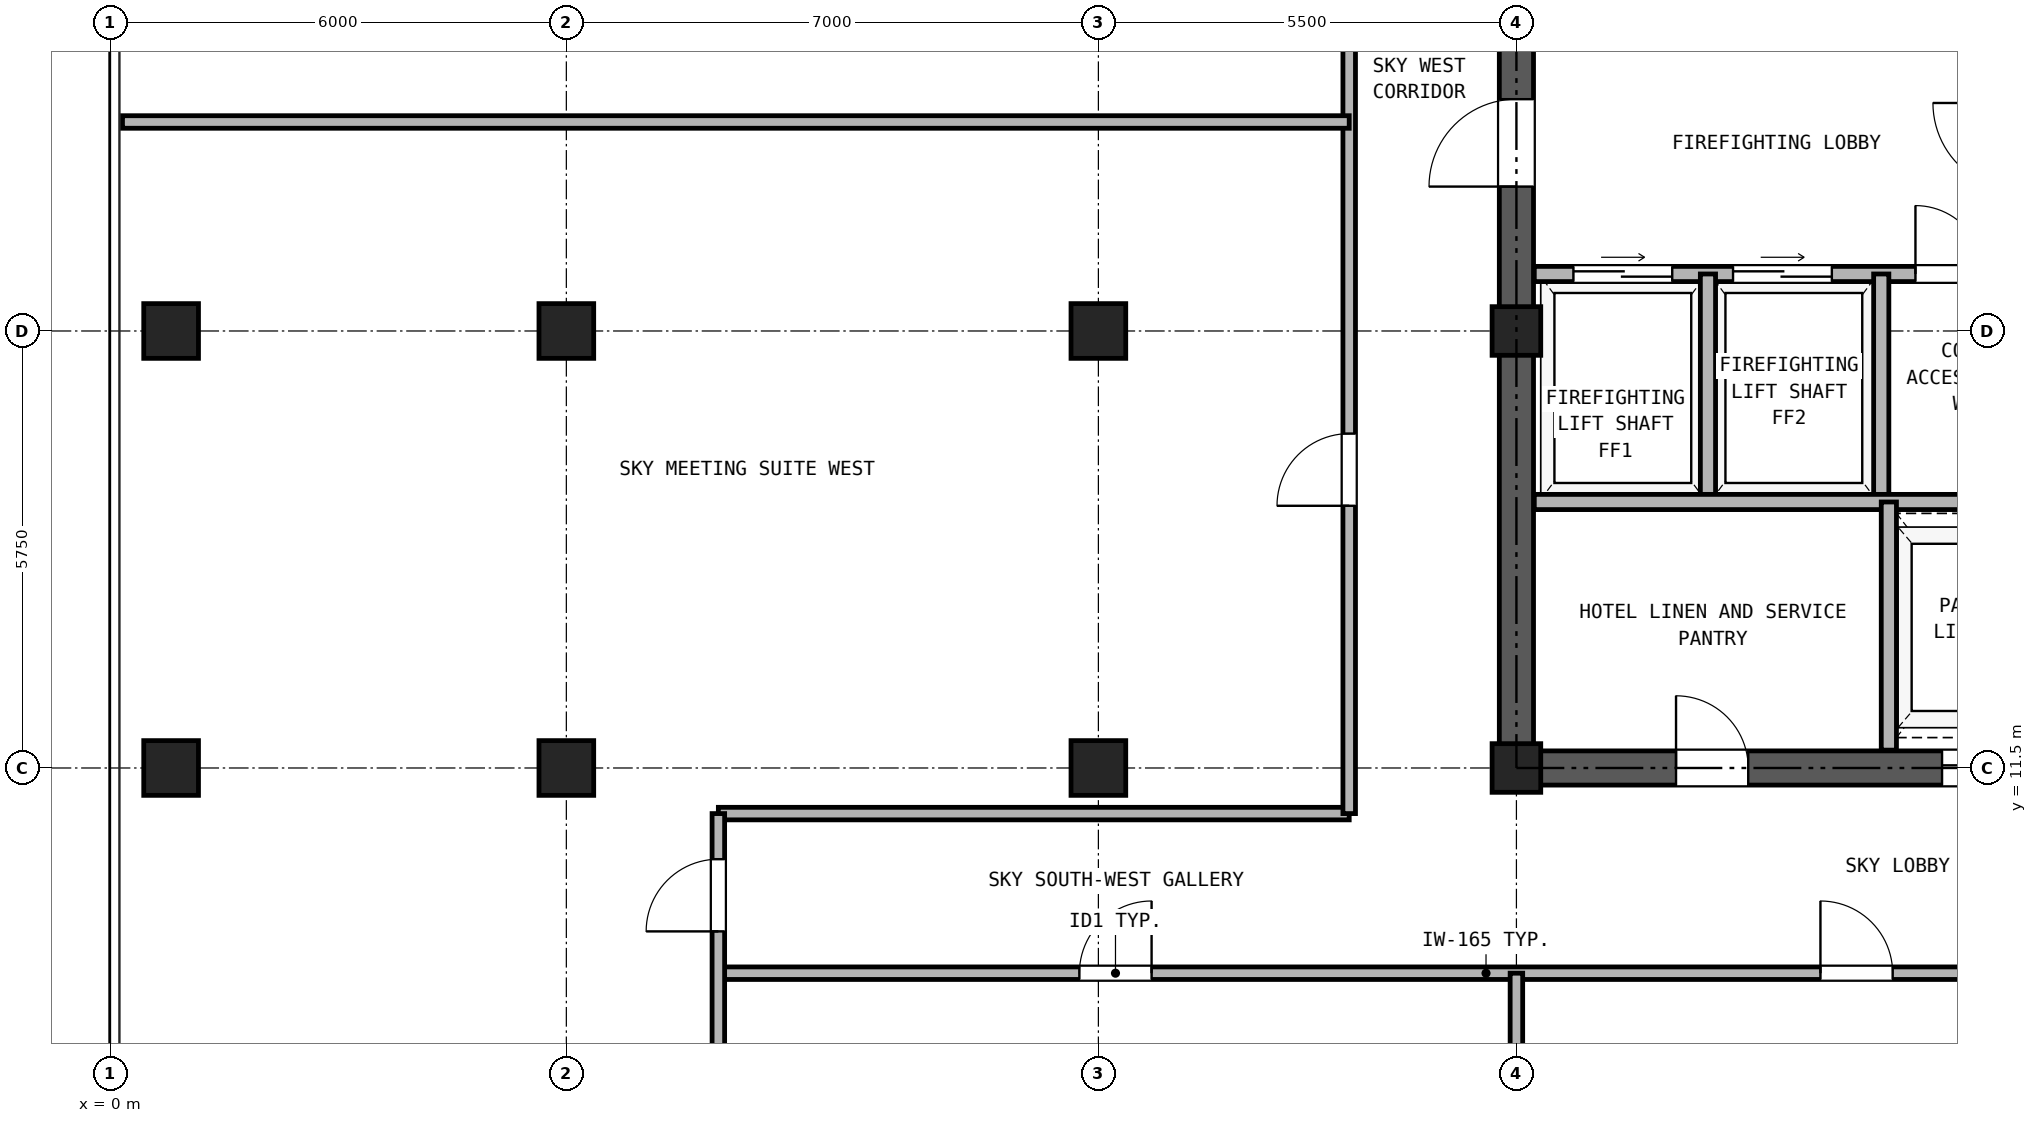
"""IFC4 building model, lengths in metres.
Left out: names, types, materials, properties, quantities, classifications, styles, units other than length and angle.
Written with IfcOpenShell. Run it as: python <this file> out.ifc"""

import sys

from ifc_helpers import new_model, si_unit, direction, frame, frame_2d, origin, origin_2d, place, context, subcontext, project, spatial, rectangle, hollow_rectangle, extrude, source, transform, mapped, element, fill, save


model = new_model("IFC4")
c1 = context("Model", 3, precision=1e-05, world=origin(), true_north=direction((0.0, 1.0)))
c2 = subcontext(c1, "Body", "Model", "MODEL_VIEW")
j1 = project(units=[si_unit("LENGTHUNIT", "METRE"), si_unit("PLANEANGLEUNIT", "RADIAN")], contexts=[c1])
p1 = place(None, origin())
s1 = spatial("IfcSite", under=j1, at=p1, CompositionType="ELEMENT")
p2 = place(p1, origin())
s2 = spatial("IfcBuilding", under=s1, at=p2, CompositionType="ELEMENT")
p3 = place(p2, frame((0.0, 0.0, 151.6)))
s3 = spatial("IfcBuildingStorey", under=s2, at=p3, CompositionType="ELEMENT", Elevation=151.6)
m1 = source(origin(), c2, "Body", "SweptSolid", [
    extrude(hollow_rectangle(XDim=0.72, YDim=0.72, WallThickness=0.04, at=origin_2d()), origin(), (0.0, 0.0, 1.0), 4.25),
])
for number, where, z_axis, x_axis in (
    (1, (0.8, 11.5, 0.0), (0.0, 0.0, 1.0), (1.0, 0.0, 0.0)),
    (2, (0.8, 17.25, 0.0), (0.0, 0.0, 1.0), (1.0, 0.0, 0.0)),
    (3, (6.0, 11.5, 0.0), (0.0, 0.0, 1.0), (1.0, 0.0, 0.0)),
    (4, (6.0, 17.25, 0.0), (0.0, 0.0, 1.0), (1.0, 0.0, 0.0)),
    (5, (13.0, 11.5, 0.0), (0.0, 0.0, 1.0), (1.0, 0.0, 0.0)),
    (6, (13.0, 17.25, 0.0), (0.0, 0.0, 1.0), (1.0, 0.0, 0.0)),
):
    element("IfcColumn", number, at=place(p3, frame(where, z_axis=z_axis, x_axis=x_axis)), inside=s3, PredefinedType="COLUMN", context=c2, shape_type="MappedRepresentation", body=[
        mapped(m1, transform((0.0, 0.0, 0.0), x_axis=(1.0, 0.0, 0.0), y_axis=(0.0, 1.0, 0.0), z_axis=(0.0, 0.0, 1.0), scale=1.0)),
    ])
m2 = source(origin(), c2, "Body", "SweptSolid", [
    extrude(hollow_rectangle(XDim=0.64, YDim=0.64, WallThickness=0.035, at=origin_2d()), origin(), (0.0, 0.0, 1.0), 4.25),
])
for number, where, z_axis, x_axis in (
    (7, (18.5, 11.5, 0.0), (0.0, 0.0, 1.0), (1.0, 0.0, 0.0)),
    (8, (18.5, 17.25, 0.0), (0.0, 0.0, 1.0), (1.0, 0.0, 0.0)),
):
    element("IfcColumn", number, at=place(p3, frame(where, z_axis=z_axis, x_axis=x_axis)), inside=s3, PredefinedType="COLUMN", context=c2, shape_type="MappedRepresentation", body=[
        mapped(m2, transform((0.0, 0.0, 0.0), x_axis=(1.0, 0.0, 0.0), y_axis=(0.0, 1.0, 0.0), z_axis=(0.0, 0.0, 1.0), scale=1.0)),
    ])
p4 = place(p3, frame((18.275, 11.5, 0.0), z_axis=(0.0, 0.0, 1.0), x_axis=(1.0, 0.0, 0.0)))
e9 = element("IfcWall", 9, at=p4, inside=s3, PredefinedType="SHEAR", context=c2, shape_type="SweptSolid", body=[
    extrude(rectangle(XDim=10.45, YDim=0.45, at=frame_2d((5.225, 0.0))), origin(), (0.0, 0.0, 1.0), 4.25),
])
p5 = place(p4, frame((2.325, 0.0, 0.0)))
e10 = element("IfcOpeningElement", 10, at=p5, cuts=e9, PredefinedType="OPENING", context=c2, shape_type="SweptSolid", body=[
    extrude(rectangle(XDim=0.95, YDim=2.15, at=frame_2d((0.475, 1.075))), frame((0.0, 0.235, 0.0), z_axis=(0.0, -1.0, 0.0), x_axis=(1.0, 0.0, 0.0)), (0.0, 0.0, 1.0), 0.47),
])
p6 = place(p4, frame((5.825, 0.0, 0.0)))
e11 = element("IfcOpeningElement", 11, at=p6, cuts=e9, PredefinedType="OPENING", context=c2, shape_type="SweptSolid", body=[
    extrude(rectangle(XDim=1.1, YDim=2.25, at=frame_2d((0.55, 1.125))), frame((0.0, 0.235, 0.0), z_axis=(0.0, -1.0, 0.0), x_axis=(1.0, 0.0, 0.0)), (0.0, 0.0, 1.0), 0.47),
])
p7 = place(p4, frame((8.225, 0.0, 0.0)))
e12 = element("IfcOpeningElement", 12, at=p7, cuts=e9, PredefinedType="OPENING", context=c2, shape_type="SweptSolid", body=[
    extrude(rectangle(XDim=1.1, YDim=2.25, at=frame_2d((0.55, 1.125))), frame((0.0, 0.235, 0.0), z_axis=(0.0, -1.0, 0.0), x_axis=(1.0, 0.0, 0.0)), (0.0, 0.0, 1.0), 0.47),
])
p8 = place(p3, frame((18.5, 11.725, 0.0), z_axis=(0.0, 0.0, 1.0), x_axis=(0.0, 1.0, 0.0)))
e13 = element("IfcWall", 13, at=p8, inside=s3, PredefinedType="SHEAR", context=c2, shape_type="SweptSolid", body=[
    extrude(rectangle(XDim=16.8, YDim=0.45, at=frame_2d((8.4, 0.0))), origin(), (0.0, 0.0, 1.0), 4.25),
])
p9 = place(p8, frame((7.425, 0.0, 0.0)))
e14 = element("IfcOpeningElement", 14, at=p9, cuts=e13, PredefinedType="OPENING", context=c2, shape_type="SweptSolid", body=[
    extrude(rectangle(XDim=1.15, YDim=2.2, at=frame_2d((0.575, 1.1))), frame((0.0, 0.235, 0.0), z_axis=(0.0, -1.0, 0.0), x_axis=(1.0, 0.0, 0.0)), (0.0, 0.0, 1.0), 0.47),
])
p10 = place(p3, frame((18.735, 18.0, 0.0), z_axis=(0.0, 0.0, 1.0), x_axis=(1.0, 0.0, 0.0)))
e15 = element("IfcWall", 15, at=p10, inside=s3, PredefinedType="PARTITIONING", context=c2, shape_type="SweptSolid", body=[
    extrude(rectangle(XDim=9.53, YDim=0.2, at=frame_2d((4.765, 0.0))), origin(), (0.0, 0.0, 1.0), 4.25),
])
p11 = place(p10, frame((0.515, 0.0, 0.0)))
e16 = element("IfcOpeningElement", 16, at=p11, cuts=e15, PredefinedType="OPENING", context=c2, shape_type="SweptSolid", body=[
    extrude(rectangle(XDim=1.3, YDim=2.3, at=frame_2d((0.65, 1.15))), frame((0.0, 0.11, 0.0), z_axis=(0.0, -1.0, 0.0), x_axis=(1.0, 0.0, 0.0)), (0.0, 0.0, 1.0), 0.22),
])
p12 = place(p10, frame((2.615, 0.0, 0.0)))
e17 = element("IfcOpeningElement", 17, at=p12, cuts=e15, PredefinedType="OPENING", context=c2, shape_type="SweptSolid", body=[
    extrude(rectangle(XDim=1.3, YDim=2.3, at=frame_2d((0.65, 1.15))), frame((0.0, 0.11, 0.0), z_axis=(0.0, -1.0, 0.0), x_axis=(1.0, 0.0, 0.0)), (0.0, 0.0, 1.0), 0.22),
])
p13 = place(p10, frame((5.015, 0.0, 0.0)))
e18 = element("IfcOpeningElement", 18, at=p13, cuts=e15, PredefinedType="OPENING", context=c2, shape_type="SweptSolid", body=[
    extrude(rectangle(XDim=0.9, YDim=2.05, at=frame_2d((0.45, 1.025))), frame((0.0, 0.11, 0.0), z_axis=(0.0, -1.0, 0.0), x_axis=(1.0, 0.0, 0.0)), (0.0, 0.0, 1.0), 0.22),
])
p14 = place(p10, frame((7.715, 0.0, 0.0)))
e19 = element("IfcOpeningElement", 19, at=p14, cuts=e15, PredefinedType="OPENING", context=c2, shape_type="SweptSolid", body=[
    extrude(rectangle(XDim=0.9, YDim=2.05, at=frame_2d((0.45, 1.025))), frame((0.0, 0.11, 0.0), z_axis=(0.0, -1.0, 0.0), x_axis=(1.0, 0.0, 0.0)), (0.0, 0.0, 1.0), 0.22),
])
for number, where, z_axis, x_axis in (
    (20, (21.02, 15.0, 0.0), (0.0, 0.0, 1.0), (0.0, 1.0, 0.0)),
    (21, (23.3, 15.0, 0.0), (0.0, 0.0, 1.0), (0.0, 1.0, 0.0)),
):
    element("IfcWall", number, at=place(p3, frame(where, z_axis=z_axis, x_axis=x_axis)), inside=s3, PredefinedType="PARTITIONING", context=c2, shape_type="SweptSolid", body=[
        extrude(rectangle(XDim=3.0, YDim=0.2, at=frame_2d((1.5, 0.0))), origin(), (0.0, 0.0, 1.0), 4.25),
    ])
p15 = place(p3, frame((18.735, 15.0, 0.0), z_axis=(0.0, 0.0, 1.0), x_axis=(1.0, 0.0, 0.0)))
e22 = element("IfcWall", 22, at=p15, inside=s3, PredefinedType="PARTITIONING", context=c2, shape_type="SweptSolid", body=[
    extrude(rectangle(XDim=9.53, YDim=0.2, at=frame_2d((4.765, 0.0))), origin(), (0.0, 0.0, 1.0), 4.25),
])
p16 = place(p3, frame((23.4, 11.735, 0.0), z_axis=(0.0, 0.0, 1.0), x_axis=(0.0, 1.0, 0.0)))
e23 = element("IfcWall", 23, at=p16, inside=s3, PredefinedType="PARTITIONING", context=c2, shape_type="SweptSolid", body=[
    extrude(rectangle(XDim=3.265, YDim=0.2, at=frame_2d((1.632, 0.0))), origin(), (0.0, 0.0, 1.0), 4.25),
])
p17 = place(p3, frame((8.0, 8.8, 0.0), z_axis=(0.0, 0.0, 1.0), x_axis=(1.0, 0.0, 0.0)))
e24 = element("IfcWall", 24, at=p17, inside=s3, PredefinedType="PARTITIONING", context=c2, shape_type="SweptSolid", body=[
    extrude(rectangle(XDim=27.64, YDim=0.165, at=frame_2d((13.82, 0.0))), origin(), (0.0, 0.0, 1.0), 4.25),
])
p18 = place(p17, frame((4.75, 0.0, 0.0)))
e25 = element("IfcOpeningElement", 25, at=p18, cuts=e24, PredefinedType="OPENING", context=c2, shape_type="SweptSolid", body=[
    extrude(rectangle(XDim=0.95, YDim=2.15, at=frame_2d((0.475, 1.075))), frame((0.0, 0.093, 0.0), z_axis=(0.0, -1.0, 0.0), x_axis=(1.0, 0.0, 0.0)), (0.0, 0.0, 1.0), 0.185),
])
p19 = place(p17, frame((14.5, 0.0, 0.0)))
e26 = element("IfcOpeningElement", 26, at=p19, cuts=e24, PredefinedType="OPENING", context=c2, shape_type="SweptSolid", body=[
    extrude(rectangle(XDim=0.95, YDim=2.15, at=frame_2d((0.475, 1.075))), frame((0.0, 0.093, 0.0), z_axis=(0.0, -1.0, 0.0), x_axis=(1.0, 0.0, 0.0)), (0.0, 0.0, 1.0), 0.185),
])
p20 = place(p17, frame((21.0, 0.0, 0.0)))
e27 = element("IfcOpeningElement", 27, at=p20, cuts=e24, PredefinedType="OPENING", context=c2, shape_type="SweptSolid", body=[
    extrude(rectangle(XDim=0.95, YDim=2.15, at=frame_2d((0.475, 1.075))), frame((0.0, 0.093, 0.0), z_axis=(0.0, -1.0, 0.0), x_axis=(1.0, 0.0, 0.0)), (0.0, 0.0, 1.0), 0.185),
])
p21 = place(p17, frame((24.15, 0.0, 0.0)))
e28 = element("IfcOpeningElement", 28, at=p21, cuts=e24, PredefinedType="OPENING", context=c2, shape_type="SweptSolid", body=[
    extrude(rectangle(XDim=1.0, YDim=2.15, at=frame_2d((0.5, 1.075))), frame((0.0, 0.093, 0.0), z_axis=(0.0, -1.0, 0.0), x_axis=(1.0, 0.0, 0.0)), (0.0, 0.0, 1.0), 0.185),
])
p22 = place(p17, frame((26.22, 0.0, 0.0)))
e29 = element("IfcOpeningElement", 29, at=p22, cuts=e24, PredefinedType="OPENING", context=c2, shape_type="SweptSolid", body=[
    extrude(rectangle(XDim=0.92, YDim=2.1, at=frame_2d((0.46, 1.05))), frame((0.0, 0.093, 0.0), z_axis=(0.0, -1.0, 0.0), x_axis=(1.0, 0.0, 0.0)), (0.0, 0.0, 1.0), 0.185),
])
p23 = place(p3, frame((8.0, 10.9, 0.0), z_axis=(0.0, 0.0, 1.0), x_axis=(1.0, 0.0, 0.0)))
e30 = element("IfcWall", 30, at=p23, inside=s3, PredefinedType="PARTITIONING", context=c2, shape_type="SweptSolid", body=[
    extrude(rectangle(XDim=8.3, YDim=0.165, at=frame_2d((4.15, 0.0))), origin(), (0.0, 0.0, 1.0), 4.25),
])
p24 = place(p3, frame((16.3, 10.9, 0.0), z_axis=(0.0, 0.0, 1.0), x_axis=(0.0, 1.0, 0.0)))
e31 = element("IfcWall", 31, at=p24, inside=s3, PredefinedType="PARTITIONING", context=c2, shape_type="SweptSolid", body=[
    extrude(rectangle(XDim=18.35, YDim=0.165, at=frame_2d((9.175, 0.0))), origin(), (0.0, 0.0, 1.0), 4.25),
])
p25 = place(p24, frame((4.05, 0.0, 0.0)))
e32 = element("IfcOpeningElement", 32, at=p25, cuts=e31, PredefinedType="OPENING", context=c2, shape_type="SweptSolid", body=[
    extrude(rectangle(XDim=0.95, YDim=2.15, at=frame_2d((0.475, 1.075))), frame((0.0, 0.093, 0.0), z_axis=(0.0, -1.0, 0.0), x_axis=(1.0, 0.0, 0.0)), (0.0, 0.0, 1.0), 0.185),
])
p26 = place(p24, frame((13.225, 0.0, 0.0)))
e33 = element("IfcOpeningElement", 33, at=p26, cuts=e31, PredefinedType="OPENING", context=c2, shape_type="SweptSolid", body=[
    extrude(rectangle(XDim=0.95, YDim=2.15, at=frame_2d((0.475, 1.075))), frame((0.0, 0.093, 0.0), z_axis=(0.0, -1.0, 0.0), x_axis=(1.0, 0.0, 0.0)), (0.0, 0.0, 1.0), 0.185),
])
p27 = place(p3, frame((8.0, 0.16, 0.0), z_axis=(0.0, 0.0, 1.0), x_axis=(0.0, 1.0, 0.0)))
e34 = element("IfcWall", 34, at=p27, inside=s3, PredefinedType="PARTITIONING", context=c2, shape_type="SweptSolid", body=[
    extrude(rectangle(XDim=10.74, YDim=0.165, at=frame_2d((5.37, 0.0))), origin(), (0.0, 0.0, 1.0), 4.25),
])
p28 = place(p27, frame((9.19, 0.0, 0.0)))
e35 = element("IfcOpeningElement", 35, at=p28, cuts=e34, PredefinedType="OPENING", context=c2, shape_type="SweptSolid", body=[
    extrude(rectangle(XDim=0.95, YDim=2.15, at=frame_2d((0.475, 1.075))), frame((0.0, 0.093, 0.0), z_axis=(0.0, -1.0, 0.0), x_axis=(1.0, 0.0, 0.0)), (0.0, 0.0, 1.0), 0.185),
])
p29 = place(p3, frame((18.5, 0.16, 0.0), z_axis=(0.0, 0.0, 1.0), x_axis=(0.0, 1.0, 0.0)))
e36 = element("IfcWall", 36, at=p29, inside=s3, PredefinedType="PARTITIONING", context=c2, shape_type="SweptSolid", body=[
    extrude(rectangle(XDim=8.64, YDim=0.165, at=frame_2d((4.32, 0.0))), origin(), (0.0, 0.0, 1.0), 3.623),
])
p30 = place(p3, frame((0.16, 20.0, 0.0), z_axis=(0.0, 0.0, 1.0), x_axis=(1.0, 0.0, 0.0)))
e37 = element("IfcWall", 37, at=p30, inside=s3, PredefinedType="PARTITIONING", context=c2, shape_type="SweptSolid", body=[
    extrude(rectangle(XDim=16.14, YDim=0.165, at=frame_2d((8.07, 0.0))), origin(), (0.0, 0.0, 1.0), 3.883),
])
p31 = place(p11, origin())
e38 = element("IfcDoor", 38, at=p31, inside=s3, OperationType="DOUBLE_DOOR_SLIDING", PredefinedType="DOOR", context=c2, shape_type="SweptSolid", body=[
    extrude(rectangle(XDim=1.3, YDim=2.3, at=frame_2d((0.65, 1.15))), frame((0.0, 0.025, 0.0), z_axis=(0.0, -1.0, 0.0), x_axis=(1.0, 0.0, 0.0)), (0.0, 0.0, 1.0), 0.05),
])
fill(e16, e38)
p32 = place(p12, origin())
e39 = element("IfcDoor", 39, at=p32, inside=s3, OperationType="DOUBLE_DOOR_SLIDING", PredefinedType="DOOR", context=c2, shape_type="SweptSolid", body=[
    extrude(rectangle(XDim=1.3, YDim=2.3, at=frame_2d((0.65, 1.15))), frame((0.0, 0.025, 0.0), z_axis=(0.0, -1.0, 0.0), x_axis=(1.0, 0.0, 0.0)), (0.0, 0.0, 1.0), 0.05),
])
fill(e17, e39)
p33 = place(p13, frame((0.9, 0.0, 0.0), z_axis=(0.0, 0.0, 1.0), x_axis=(-1.0, 0.0, 0.0)))
e40 = element("IfcDoor", 40, at=p33, inside=s3, OperationType="SINGLE_SWING_LEFT", PredefinedType="DOOR", context=c2, shape_type="SweptSolid", body=[
    extrude(rectangle(XDim=0.9, YDim=2.05, at=frame_2d((0.45, 1.025))), frame((0.0, 0.025, 0.0), z_axis=(0.0, -1.0, 0.0), x_axis=(1.0, 0.0, 0.0)), (0.0, 0.0, 1.0), 0.05),
])
fill(e18, e40)
p34 = place(p9, frame((1.15, 0.0, 0.0), z_axis=(0.0, 0.0, 1.0), x_axis=(-1.0, 0.0, 0.0)))
e41 = element("IfcDoor", 41, at=p34, inside=s3, OperationType="SINGLE_SWING_LEFT", PredefinedType="DOOR", context=c2, shape_type="SweptSolid", body=[
    extrude(rectangle(XDim=1.15, YDim=2.2, at=frame_2d((0.575, 1.1))), frame((0.0, 0.025, 0.0), z_axis=(0.0, -1.0, 0.0), x_axis=(1.0, 0.0, 0.0)), (0.0, 0.0, 1.0), 0.05),
])
fill(e14, e41)
p35 = place(p5, frame((0.95, 0.0, 0.0), z_axis=(0.0, 0.0, 1.0), x_axis=(-1.0, 0.0, 0.0)))
e42 = element("IfcDoor", 42, at=p35, inside=s3, OperationType="SINGLE_SWING_LEFT", PredefinedType="DOOR", context=c2, shape_type="SweptSolid", body=[
    extrude(rectangle(XDim=0.95, YDim=2.15, at=frame_2d((0.475, 1.075))), frame((0.0, 0.025, 0.0), z_axis=(0.0, -1.0, 0.0), x_axis=(1.0, 0.0, 0.0)), (0.0, 0.0, 1.0), 0.05),
])
fill(e10, e42)
p36 = place(p6, frame((1.1, 0.0, 0.0), z_axis=(0.0, 0.0, 1.0), x_axis=(-1.0, 0.0, 0.0)))
e43 = element("IfcDoor", 43, at=p36, inside=s3, OperationType="DOUBLE_DOOR_SLIDING", PredefinedType="DOOR", context=c2, shape_type="SweptSolid", body=[
    extrude(rectangle(XDim=1.1, YDim=2.25, at=frame_2d((0.55, 1.125))), frame((0.0, 0.025, 0.0), z_axis=(0.0, -1.0, 0.0), x_axis=(1.0, 0.0, 0.0)), (0.0, 0.0, 1.0), 0.05),
])
fill(e11, e43)
p37 = place(p18, frame((0.95, 0.0, 0.0), z_axis=(0.0, 0.0, 1.0), x_axis=(-1.0, 0.0, 0.0)))
e44 = element("IfcDoor", 44, at=p37, inside=s3, OperationType="SINGLE_SWING_RIGHT", PredefinedType="DOOR", context=c2, shape_type="SweptSolid", body=[
    extrude(rectangle(XDim=0.95, YDim=2.15, at=frame_2d((0.475, 1.075))), frame((0.0, 0.025, 0.0), z_axis=(0.0, -1.0, 0.0), x_axis=(1.0, 0.0, 0.0)), (0.0, 0.0, 1.0), 0.05),
])
fill(e25, e44)
p38 = place(p19, frame((0.95, 0.0, 0.0), z_axis=(0.0, 0.0, 1.0), x_axis=(-1.0, 0.0, 0.0)))
e45 = element("IfcDoor", 45, at=p38, inside=s3, OperationType="SINGLE_SWING_LEFT", PredefinedType="DOOR", context=c2, shape_type="SweptSolid", body=[
    extrude(rectangle(XDim=0.95, YDim=2.15, at=frame_2d((0.475, 1.075))), frame((0.0, 0.025, 0.0), z_axis=(0.0, -1.0, 0.0), x_axis=(1.0, 0.0, 0.0)), (0.0, 0.0, 1.0), 0.05),
])
fill(e26, e45)
p39 = place(p28, frame((0.95, 0.0, 0.0), z_axis=(0.0, 0.0, 1.0), x_axis=(-1.0, 0.0, 0.0)))
e46 = element("IfcDoor", 46, at=p39, inside=s3, OperationType="SINGLE_SWING_LEFT", PredefinedType="DOOR", context=c2, shape_type="SweptSolid", body=[
    extrude(rectangle(XDim=0.95, YDim=2.15, at=frame_2d((0.475, 1.075))), frame((0.0, 0.025, 0.0), z_axis=(0.0, -1.0, 0.0), x_axis=(1.0, 0.0, 0.0)), (0.0, 0.0, 1.0), 0.05),
])
fill(e35, e46)
p40 = place(p25, frame((0.95, 0.0, 0.0), z_axis=(0.0, 0.0, 1.0), x_axis=(-1.0, 0.0, 0.0)))
e47 = element("IfcDoor", 47, at=p40, inside=s3, OperationType="SINGLE_SWING_LEFT", PredefinedType="DOOR", context=c2, shape_type="SweptSolid", body=[
    extrude(rectangle(XDim=0.95, YDim=2.15, at=frame_2d((0.475, 1.075))), frame((0.0, 0.025, 0.0), z_axis=(0.0, -1.0, 0.0), x_axis=(1.0, 0.0, 0.0)), (0.0, 0.0, 1.0), 0.05),
])
fill(e32, e47)
save(model, sys.argv[1])
